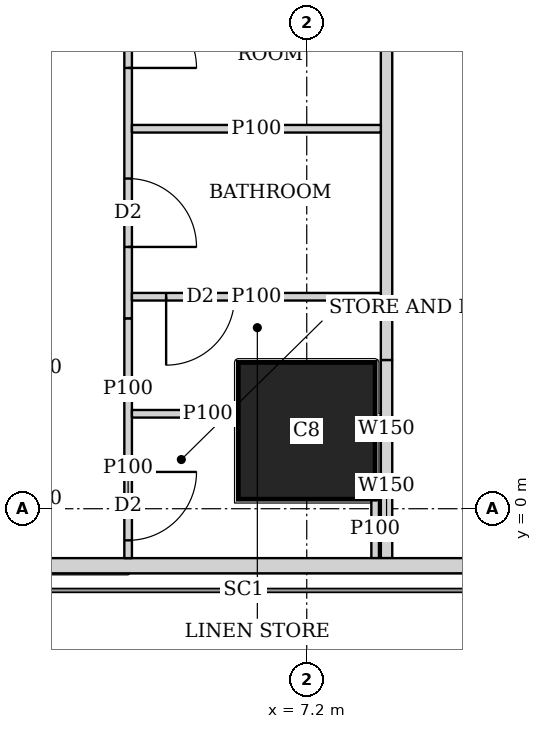
"""IFC4 building model, lengths in metres.
Left out: names, types, materials, properties, quantities, classifications, styles, units other than length and angle.
Written with IfcOpenShell. Run it as: python <this file> out.ifc"""

import sys

from ifc_helpers import new_model, si_unit, direction, frame, frame_2d, origin, origin_2d, place, context, subcontext, project, spatial, rectangle, extrude, element, fill, save


model = new_model("IFC4")
c1 = context("Model", 3, precision=1e-05, world=origin(), true_north=direction((0.0, 1.0)))
c2 = subcontext(c1, "Body", "Model", "MODEL_VIEW")
j1 = project(units=[si_unit("LENGTHUNIT", "METRE"), si_unit("PLANEANGLEUNIT", "RADIAN")], contexts=[c1])
p1 = place(None, origin())
s1 = spatial("IfcSite", under=j1, at=p1, CompositionType="ELEMENT")
p2 = place(p1, origin())
s2 = spatial("IfcBuilding", under=s1, at=p2, CompositionType="ELEMENT")
p3 = place(p2, frame((0.0, 0.0, 169.55)))
s3 = spatial("IfcBuildingStorey", under=s2, at=p3, CompositionType="ELEMENT", Elevation=169.55)
p4 = place(p3, frame((7.2, 1.025, 0.0), z_axis=(0.0, 0.0, 1.0), x_axis=(1.0, 0.0, 0.0)))
e1 = element("IfcColumn", 1, at=p4, inside=s3, PredefinedType="COLUMN", context=c2, shape_type="SweptSolid", body=[
    extrude(rectangle(XDim=1.8, YDim=1.8, at=origin_2d()), origin(), (0.0, 0.0, 1.0), 3.75),
])
p5 = place(p3, frame((2.163, -0.75, 0.0), z_axis=(0.0, 0.0, 1.0), x_axis=(1.0, 0.0, 0.0)))
e2 = element("IfcWall", 2, at=p5, inside=s3, PredefinedType="SOLIDWALL", context=c2, shape_type="SweptSolid", body=[
    extrude(rectangle(XDim=45.628, YDim=0.2, at=frame_2d((22.814, 0.0))), origin(), (0.0, 0.0, 1.0), 3.5),
])
p6 = place(p5, frame((9.537, 0.0, 0.9)))
e3 = element("IfcOpeningElement", 3, at=p6, cuts=e2, PredefinedType="OPENING", context=c2, shape_type="SweptSolid", body=[
    extrude(rectangle(XDim=1.8, YDim=1.5, at=frame_2d((0.9, 0.75))), frame((0.0, 0.11, 0.0), z_axis=(0.0, -1.0, 0.0), x_axis=(1.0, 0.0, 0.0)), (0.0, 0.0, 1.0), 0.22),
])
p7 = place(p5, frame((13.137, 0.0, 0.9)))
e4 = element("IfcOpeningElement", 4, at=p7, cuts=e2, PredefinedType="OPENING", context=c2, shape_type="SweptSolid", body=[
    extrude(rectangle(XDim=1.8, YDim=1.5, at=frame_2d((0.9, 0.75))), frame((0.0, 0.11, 0.0), z_axis=(0.0, -1.0, 0.0), x_axis=(1.0, 0.0, 0.0)), (0.0, 0.0, 1.0), 0.22),
])
p8 = place(p5, frame((16.737, 0.0, 0.9)))
e5 = element("IfcOpeningElement", 5, at=p8, cuts=e2, PredefinedType="OPENING", context=c2, shape_type="SweptSolid", body=[
    extrude(rectangle(XDim=1.8, YDim=1.5, at=frame_2d((0.9, 0.75))), frame((0.0, 0.11, 0.0), z_axis=(0.0, -1.0, 0.0), x_axis=(1.0, 0.0, 0.0)), (0.0, 0.0, 1.0), 0.22),
])
p9 = place(p5, frame((20.337, 0.0, 0.9)))
e6 = element("IfcOpeningElement", 6, at=p9, cuts=e2, PredefinedType="OPENING", context=c2, shape_type="SweptSolid", body=[
    extrude(rectangle(XDim=1.8, YDim=1.5, at=frame_2d((0.9, 0.75))), frame((0.0, 0.11, 0.0), z_axis=(0.0, -1.0, 0.0), x_axis=(1.0, 0.0, 0.0)), (0.0, 0.0, 1.0), 0.22),
])
p10 = place(p5, frame((23.937, 0.0, 0.9)))
e7 = element("IfcOpeningElement", 7, at=p10, cuts=e2, PredefinedType="OPENING", context=c2, shape_type="SweptSolid", body=[
    extrude(rectangle(XDim=1.8, YDim=1.5, at=frame_2d((0.9, 0.75))), frame((0.0, 0.11, 0.0), z_axis=(0.0, -1.0, 0.0), x_axis=(1.0, 0.0, 0.0)), (0.0, 0.0, 1.0), 0.22),
])
p11 = place(p5, frame((27.537, 0.0, 0.9)))
e8 = element("IfcOpeningElement", 8, at=p11, cuts=e2, PredefinedType="OPENING", context=c2, shape_type="SweptSolid", body=[
    extrude(rectangle(XDim=1.8, YDim=1.5, at=frame_2d((0.9, 0.75))), frame((0.0, 0.11, 0.0), z_axis=(0.0, -1.0, 0.0), x_axis=(1.0, 0.0, 0.0)), (0.0, 0.0, 1.0), 0.22),
])
p12 = place(p5, frame((31.137, 0.0, 0.9)))
e9 = element("IfcOpeningElement", 9, at=p12, cuts=e2, PredefinedType="OPENING", context=c2, shape_type="SweptSolid", body=[
    extrude(rectangle(XDim=1.8, YDim=1.5, at=frame_2d((0.9, 0.75))), frame((0.0, 0.11, 0.0), z_axis=(0.0, -1.0, 0.0), x_axis=(1.0, 0.0, 0.0)), (0.0, 0.0, 1.0), 0.22),
])
p13 = place(p5, frame((34.737, 0.0, 0.9)))
e10 = element("IfcOpeningElement", 10, at=p13, cuts=e2, PredefinedType="OPENING", context=c2, shape_type="SweptSolid", body=[
    extrude(rectangle(XDim=1.8, YDim=1.5, at=frame_2d((0.9, 0.75))), frame((0.0, 0.11, 0.0), z_axis=(0.0, -1.0, 0.0), x_axis=(1.0, 0.0, 0.0)), (0.0, 0.0, 1.0), 0.22),
])
p14 = place(p3, frame((8.25, -0.65, 0.0), z_axis=(0.0, 0.0, 1.0), x_axis=(0.0, 1.0, 0.0)))
e11 = element("IfcWall", 11, at=p14, inside=s3, PredefinedType="SOLIDWALL", context=c2, shape_type="SweptSolid", body=[
    extrude(rectangle(XDim=0.802, YDim=0.15, at=frame_2d((0.401, 0.0))), origin(), (0.0, 0.0, 1.0), 3.5),
])
p15 = place(p3, frame((8.25, 0.152, 0.0), z_axis=(0.0, 0.0, 1.0), x_axis=(0.0, 1.0, 0.0)))
e12 = element("IfcWall", 12, at=p15, inside=s3, PredefinedType="SOLIDWALL", context=c2, shape_type="SweptSolid", body=[
    extrude(rectangle(XDim=1.805, YDim=0.15, at=frame_2d((0.902, 0.0))), origin(), (0.0, 0.0, 1.0), 2.1),
])
p16 = place(p3, frame((8.25, 1.957, 0.0), z_axis=(0.0, 0.0, 1.0), x_axis=(0.0, 1.0, 0.0)))
e13 = element("IfcWall", 13, at=p16, inside=s3, PredefinedType="SOLIDWALL", context=c2, shape_type="SweptSolid", body=[
    extrude(rectangle(XDim=41.111, YDim=0.15, at=frame_2d((20.556, 0.0))), origin(), (0.0, 0.0, 1.0), 3.5),
])
p17 = place(p16, frame((10.642, 0.0, 0.0)))
e14 = element("IfcOpeningElement", 14, at=p17, cuts=e13, PredefinedType="OPENING", context=c2, shape_type="SweptSolid", body=[
    extrude(rectangle(XDim=1.0, YDim=2.1, at=frame_2d((0.5, 1.05))), frame((0.0, 0.085, 0.0), z_axis=(0.0, -1.0, 0.0), x_axis=(1.0, 0.0, 0.0)), (0.0, 0.0, 1.0), 0.17),
])
p18 = place(p16, frame((15.042, 0.0, 0.0)))
e15 = element("IfcOpeningElement", 15, at=p18, cuts=e13, PredefinedType="OPENING", context=c2, shape_type="SweptSolid", body=[
    extrude(rectangle(XDim=1.0, YDim=2.1, at=frame_2d((0.5, 1.05))), frame((0.0, 0.085, 0.0), z_axis=(0.0, -1.0, 0.0), x_axis=(1.0, 0.0, 0.0)), (0.0, 0.0, 1.0), 0.17),
])
p19 = place(p16, frame((22.543, 0.0, 0.0)))
e16 = element("IfcOpeningElement", 16, at=p19, cuts=e13, PredefinedType="OPENING", context=c2, shape_type="SweptSolid", body=[
    extrude(rectangle(XDim=1.0, YDim=2.1, at=frame_2d((0.5, 1.05))), frame((0.0, 0.085, 0.0), z_axis=(0.0, -1.0, 0.0), x_axis=(1.0, 0.0, 0.0)), (0.0, 0.0, 1.0), 0.17),
])
p20 = place(p16, frame((33.142, 0.0, 0.0)))
e17 = element("IfcOpeningElement", 17, at=p20, cuts=e13, PredefinedType="OPENING", context=c2, shape_type="SweptSolid", body=[
    extrude(rectangle(XDim=1.0, YDim=2.1, at=frame_2d((0.5, 1.05))), frame((0.0, 0.085, 0.0), z_axis=(0.0, -1.0, 0.0), x_axis=(1.0, 0.0, 0.0)), (0.0, 0.0, 1.0), 0.17),
])
p21 = place(p3, frame((8.1, 0.124, 0.0), z_axis=(0.0, 0.0, 1.0), x_axis=(0.0, -1.0, 0.0)))
e18 = element("IfcWall", 18, at=p21, inside=s3, PredefinedType="PARTITIONING", context=c2, shape_type="SweptSolid", body=[
    extrude(rectangle(XDim=0.774, YDim=0.1, at=frame_2d((0.387, 0.0))), origin(), (0.0, 0.0, 1.0), 3.5),
])
p22 = place(p3, frame((4.85, -0.65, 0.0), z_axis=(0.0, 0.0, 1.0), x_axis=(0.0, 1.0, 0.0)))
e19 = element("IfcWall", 19, at=p22, inside=s3, PredefinedType="PARTITIONING", context=c2, shape_type="SweptSolid", body=[
    extrude(rectangle(XDim=1.284, YDim=0.1, at=frame_2d((0.642, 0.0))), origin(), (0.0, 0.0, 1.0), 3.5),
])
p23 = place(p22, frame((0.234, 0.0, 0.0)))
e20 = element("IfcOpeningElement", 20, at=p23, cuts=e19, PredefinedType="OPENING", context=c2, shape_type="SweptSolid", body=[
    extrude(rectangle(XDim=0.9, YDim=2.1, at=frame_2d((0.45, 1.05))), frame((0.0, 0.06, 0.0), z_axis=(0.0, -1.0, 0.0), x_axis=(1.0, 0.0, 0.0)), (0.0, 0.0, 1.0), 0.12),
])
p24 = place(p3, frame((4.85, 0.634, 0.0), z_axis=(0.0, 0.0, 1.0), x_axis=(0.0, 1.0, 0.0)))
e21 = element("IfcWall", 21, at=p24, inside=s3, PredefinedType="PARTITIONING", context=c2, shape_type="SweptSolid", body=[
    extrude(rectangle(XDim=1.871, YDim=0.1, at=frame_2d((0.936, 0.0))), origin(), (0.0, 0.0, 1.0), 2.1),
])
p25 = place(p3, frame((4.85, 2.505, 0.0), z_axis=(0.0, 0.0, 1.0), x_axis=(0.0, 1.0, 0.0)))
e22 = element("IfcWall", 22, at=p25, inside=s3, PredefinedType="PARTITIONING", context=c2, shape_type="SweptSolid", body=[
    extrude(rectangle(XDim=9.994, YDim=0.1, at=frame_2d((4.997, 0.0))), origin(), (0.0, 0.0, 1.0), 3.5),
])
p26 = place(p25, frame((8.634, 0.0, 0.0)))
e23 = element("IfcOpeningElement", 23, at=p26, cuts=e22, PredefinedType="OPENING", context=c2, shape_type="SweptSolid", body=[
    extrude(rectangle(XDim=0.9, YDim=2.1, at=frame_2d((0.45, 1.05))), frame((0.0, 0.06, 0.0), z_axis=(0.0, -1.0, 0.0), x_axis=(1.0, 0.0, 0.0)), (0.0, 0.0, 1.0), 0.12),
])
p27 = place(p25, frame((3.294, 0.0, 0.0)))
e24 = element("IfcOpeningElement", 24, at=p27, cuts=e22, PredefinedType="OPENING", context=c2, shape_type="SweptSolid", body=[
    extrude(rectangle(XDim=0.9, YDim=2.1, at=frame_2d((0.45, 1.05))), frame((0.0, 0.06, 0.0), z_axis=(0.0, -1.0, 0.0), x_axis=(1.0, 0.0, 0.0)), (0.0, 0.0, 1.0), 0.12),
])
p28 = place(p25, frame((0.939, 0.0, 0.0)))
e25 = element("IfcOpeningElement", 25, at=p28, cuts=e22, PredefinedType="OPENING", context=c2, shape_type="SweptSolid", body=[
    extrude(rectangle(XDim=0.9, YDim=2.1, at=frame_2d((0.45, 1.05))), frame((0.0, 0.06, 0.0), z_axis=(0.0, -1.0, 0.0), x_axis=(1.0, 0.0, 0.0)), (0.0, 0.0, 1.0), 0.12),
])
p29 = place(p25, frame((6.135, 0.0, 0.0)))
e26 = element("IfcOpeningElement", 26, at=p29, cuts=e22, PredefinedType="OPENING", context=c2, shape_type="SweptSolid", body=[
    extrude(rectangle(XDim=0.9, YDim=2.1, at=frame_2d((0.45, 1.05))), frame((0.0, 0.06, 0.0), z_axis=(0.0, -1.0, 0.0), x_axis=(1.0, 0.0, 0.0)), (0.0, 0.0, 1.0), 0.12),
])
p30 = place(p3, frame((4.9, 4.999, 0.0), z_axis=(0.0, 0.0, 1.0), x_axis=(1.0, 0.0, 0.0)))
e27 = element("IfcWall", 27, at=p30, inside=s3, PredefinedType="PARTITIONING", context=c2, shape_type="SweptSolid", body=[
    extrude(rectangle(XDim=3.275, YDim=0.1, at=frame_2d((1.638, 0.0))), origin(), (0.0, 0.0, 1.0), 3.5),
])
p31 = place(p3, frame((4.9, 1.249, 0.0), z_axis=(0.0, 0.0, 1.0), x_axis=(1.0, 0.0, 0.0)))
e28 = element("IfcWall", 28, at=p31, inside=s3, PredefinedType="PARTITIONING", context=c2, shape_type="SweptSolid", body=[
    extrude(rectangle(XDim=1.399, YDim=0.1, at=frame_2d((0.7, 0.0))), origin(), (0.0, 0.0, 1.0), 2.1),
])
p32 = place(p3, frame((4.9, 2.789, 0.0), z_axis=(0.0, 0.0, 1.0), x_axis=(1.0, 0.0, 0.0)))
e29 = element("IfcWall", 29, at=p32, inside=s3, PredefinedType="PARTITIONING", context=c2, shape_type="SweptSolid", body=[
    extrude(rectangle(XDim=3.275, YDim=0.1, at=frame_2d((1.638, 0.0))), origin(), (0.0, 0.0, 1.0), 3.5),
])
p33 = place(p32, frame((0.45, 0.0, 0.0)))
e30 = element("IfcOpeningElement", 30, at=p33, cuts=e29, PredefinedType="OPENING", context=c2, shape_type="SweptSolid", body=[
    extrude(rectangle(XDim=0.9, YDim=2.1, at=frame_2d((0.45, 1.05))), frame((0.0, 0.06, 0.0), z_axis=(0.0, -1.0, 0.0), x_axis=(1.0, 0.0, 0.0)), (0.0, 0.0, 1.0), 0.12),
])
p34 = place(p27, origin())
e31 = element("IfcDoor", 31, at=p34, inside=s3, OperationType="SINGLE_SWING_RIGHT", PredefinedType="DOOR", context=c2, shape_type="SweptSolid", body=[
    extrude(rectangle(XDim=0.9, YDim=2.1, at=frame_2d((0.45, 1.05))), frame((0.0, 0.025, 0.0), z_axis=(0.0, -1.0, 0.0), x_axis=(1.0, 0.0, 0.0)), (0.0, 0.0, 1.0), 0.05),
])
fill(e24, e31)
p35 = place(p28, origin())
e32 = element("IfcDoor", 32, at=p35, inside=s3, OperationType="SINGLE_SWING_RIGHT", PredefinedType="DOOR", context=c2, shape_type="SweptSolid", body=[
    extrude(rectangle(XDim=0.9, YDim=2.1, at=frame_2d((0.45, 1.05))), frame((0.0, 0.025, 0.0), z_axis=(0.0, -1.0, 0.0), x_axis=(1.0, 0.0, 0.0)), (0.0, 0.0, 1.0), 0.05),
])
fill(e25, e32)
p36 = place(p23, origin())
e33 = element("IfcDoor", 33, at=p36, inside=s3, OperationType="SINGLE_SWING_LEFT", PredefinedType="DOOR", context=c2, shape_type="SweptSolid", body=[
    extrude(rectangle(XDim=0.9, YDim=2.1, at=frame_2d((0.45, 1.05))), frame((0.0, 0.025, 0.0), z_axis=(0.0, -1.0, 0.0), x_axis=(1.0, 0.0, 0.0)), (0.0, 0.0, 1.0), 0.05),
])
fill(e20, e33)
p37 = place(p33, origin())
e34 = element("IfcDoor", 34, at=p37, inside=s3, OperationType="SINGLE_SWING_RIGHT", PredefinedType="DOOR", context=c2, shape_type="SweptSolid", body=[
    extrude(rectangle(XDim=0.9, YDim=2.1, at=frame_2d((0.45, 1.05))), frame((0.0, 0.025, 0.0), z_axis=(0.0, -1.0, 0.0), x_axis=(1.0, 0.0, 0.0)), (0.0, 0.0, 1.0), 0.05),
])
fill(e30, e34)
save(model, sys.argv[1])
